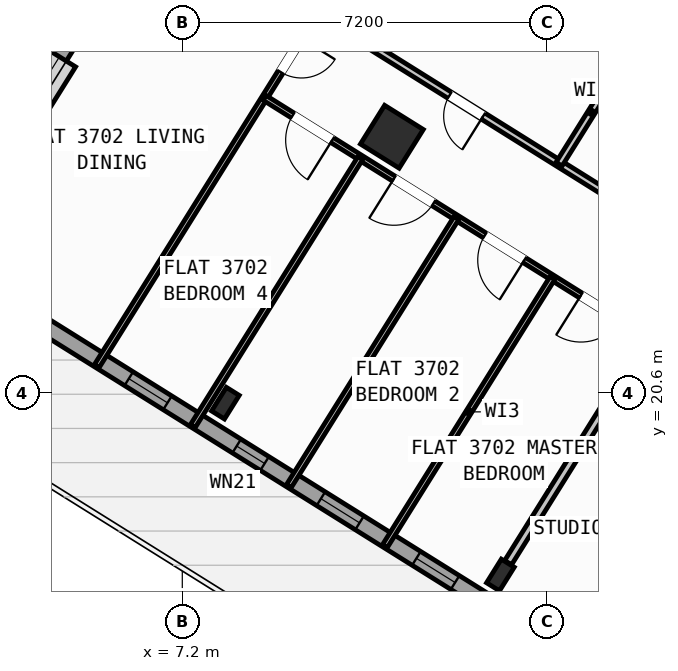
"""IFC4 building model, lengths in metres.
Left out: names, types, materials, properties, quantities, classifications, styles, units other than length and angle.
Written with IfcOpenShell. Run it as: python <this file> out.ifc"""

import sys

from ifc_helpers import new_model, si_unit, direction, frame, frame_2d, origin, origin_2d, place, context, subcontext, project, spatial, rectangle, hollow_rectangle, i_section, extrude, source, transform, mapped, element, fill, save


model = new_model("IFC4")
c1 = context("Model", 3, precision=1e-05, world=origin(), true_north=direction((0.0, 1.0)))
c2 = subcontext(c1, "Body", "Model", "MODEL_VIEW")
j1 = project(units=[si_unit("LENGTHUNIT", "METRE"), si_unit("PLANEANGLEUNIT", "RADIAN")], contexts=[c1])
p1 = place(None, origin())
s1 = spatial("IfcSite", under=j1, at=p1, CompositionType="ELEMENT")
p2 = place(p1, origin())
s2 = spatial("IfcBuilding", under=s1, at=p2, CompositionType="ELEMENT")
p3 = place(p2, frame((0.0, 0.0, 147.9)))
s3 = spatial("IfcBuildingStorey", under=s2, at=p3, CompositionType="ELEMENT", Elevation=147.9)
m1 = source(origin(), c2, "Body", "SweptSolid", [
    extrude(i_section(OverallWidth=0.3, OverallDepth=0.55, WebThickness=0.015, FlangeThickness=0.029, at=origin_2d()), origin(), (0.0, 0.0, 1.0), 3.6),
])
p4 = place(p3, frame((13.478, 17.003, 0.0), z_axis=(0.0, 0.0, 1.0), x_axis=(-0.848048096156, 0.529919264233, 0.0)))
e1 = element("IfcColumn", 1, at=p4, inside=s3, PredefinedType="COLUMN", context=c2, shape_type="MappedRepresentation", body=[
    mapped(m1, transform((0.0, 0.0, 0.0), scale=1.0)),
])
m2 = source(origin(), c2, "Body", "SweptSolid", [
    extrude(hollow_rectangle(XDim=0.9, YDim=0.9, WallThickness=0.036, at=origin_2d()), origin(), (0.0, 0.0, 1.0), 3.6),
])
p5 = place(p3, frame((11.336, 25.653, 0.0), z_axis=(0.0, 0.0, 1.0), x_axis=(-0.848048096156, 0.529919264233, 0.0)))
e2 = element("IfcColumn", 2, at=p5, inside=s3, PredefinedType="COLUMN", context=c2, shape_type="MappedRepresentation", body=[
    mapped(m2, transform((0.0, 0.0, 0.0), scale=1.0)),
])
p6 = place(p3, frame((8.051, 20.395, 0.0), z_axis=(0.0, 0.0, 1.0), x_axis=(-0.848048096156, 0.529919264233, 0.0)))
e3 = element("IfcColumn", 3, at=p6, inside=s3, PredefinedType="COLUMN", context=c2, shape_type="MappedRepresentation", body=[
    mapped(m1, transform((0.0, 0.0, 0.0), scale=1.0)),
])
p7 = place(p3, frame((29.268, 6.429, 0.0), z_axis=(0.0, 0.0, 1.0), x_axis=(-0.848049971435, 0.529916263149, 0.0)))
e4 = element("IfcWall", 4, at=p7, inside=s3, PredefinedType="STANDARD", context=c2, shape_type="SweptSolid", body=[
    extrude(rectangle(XDim=31.588, YDim=0.32, at=frame_2d((15.794, 0.0))), origin(), (0.0, 0.0, 1.0), 3.35),
])
p8 = place(p7, frame((16.362, 0.0, 0.0)))
e5 = element("IfcOpeningElement", 5, at=p8, cuts=e4, PredefinedType="OPENING", context=c2, shape_type="SweptSolid", body=[
    extrude(rectangle(XDim=1.2, YDim=2.15, at=frame_2d((0.6, 1.075))), frame((0.0, 0.17, 0.0), z_axis=(0.0, -1.0, 0.0), x_axis=(1.0, 0.0, 0.0)), (0.0, 0.0, 1.0), 0.34),
])
p9 = place(p7, frame((2.989, 0.0, 0.8)))
e6 = element("IfcOpeningElement", 6, at=p9, cuts=e4, PredefinedType="OPENING", context=c2, shape_type="SweptSolid", body=[
    extrude(rectangle(XDim=2.1, YDim=1.55, at=frame_2d((1.05, 0.775))), frame((0.0, 0.17, 0.0), z_axis=(0.0, -1.0, 0.0), x_axis=(1.0, 0.0, 0.0)), (0.0, 0.0, 1.0), 0.34),
])
p10 = place(p7, frame((8.359, 0.0, 0.8)))
e7 = element("IfcOpeningElement", 7, at=p10, cuts=e4, PredefinedType="OPENING", context=c2, shape_type="SweptSolid", body=[
    extrude(rectangle(XDim=2.1, YDim=1.55, at=frame_2d((1.05, 0.775))), frame((0.0, 0.17, 0.0), z_axis=(0.0, -1.0, 0.0), x_axis=(1.0, 0.0, 0.0)), (0.0, 0.0, 1.0), 0.34),
])
p11 = place(p7, frame((13.284, 0.0, 0.95)))
e8 = element("IfcOpeningElement", 8, at=p11, cuts=e4, PredefinedType="OPENING", context=c2, shape_type="SweptSolid", body=[
    extrude(rectangle(XDim=1.2, YDim=1.4, at=frame_2d((0.6, 0.7))), frame((0.0, 0.17, 0.0), z_axis=(0.0, -1.0, 0.0), x_axis=(1.0, 0.0, 0.0)), (0.0, 0.0, 1.0), 0.34),
])
p12 = place(p7, frame((29.188, 0.0, 0.95)))
e9 = element("IfcOpeningElement", 9, at=p12, cuts=e4, PredefinedType="OPENING", context=c2, shape_type="SweptSolid", body=[
    extrude(rectangle(XDim=1.2, YDim=1.4, at=frame_2d((0.6, 0.7))), frame((0.0, 0.17, 0.0), z_axis=(0.0, -1.0, 0.0), x_axis=(1.0, 0.0, 0.0)), (0.0, 0.0, 1.0), 0.34),
])
p13 = place(p7, frame((19.674, 0.0, 1.0)))
e10 = element("IfcOpeningElement", 10, at=p13, cuts=e4, PredefinedType="OPENING", context=c2, shape_type="SweptSolid", body=[
    extrude(rectangle(XDim=0.9, YDim=1.25, at=frame_2d((0.45, 0.625))), frame((0.0, 0.17, 0.0), z_axis=(0.0, -1.0, 0.0), x_axis=(1.0, 0.0, 0.0)), (0.0, 0.0, 1.0), 0.34),
])
p14 = place(p7, frame((21.896, 0.0, 1.0)))
e11 = element("IfcOpeningElement", 11, at=p14, cuts=e4, PredefinedType="OPENING", context=c2, shape_type="SweptSolid", body=[
    extrude(rectangle(XDim=0.9, YDim=1.25, at=frame_2d((0.45, 0.625))), frame((0.0, 0.17, 0.0), z_axis=(0.0, -1.0, 0.0), x_axis=(1.0, 0.0, 0.0)), (0.0, 0.0, 1.0), 0.34),
])
p15 = place(p7, frame((24.106, 0.0, 1.0)))
e12 = element("IfcOpeningElement", 12, at=p15, cuts=e4, PredefinedType="OPENING", context=c2, shape_type="SweptSolid", body=[
    extrude(rectangle(XDim=0.65, YDim=1.15, at=frame_2d((0.325, 0.575))), frame((0.0, 0.17, 0.0), z_axis=(0.0, -1.0, 0.0), x_axis=(1.0, 0.0, 0.0)), (0.0, 0.0, 1.0), 0.34),
])
p16 = place(p7, frame((26.366, 0.0, 1.0)))
e13 = element("IfcOpeningElement", 13, at=p16, cuts=e4, PredefinedType="OPENING", context=c2, shape_type="SweptSolid", body=[
    extrude(rectangle(XDim=0.9, YDim=1.25, at=frame_2d((0.45, 0.625))), frame((0.0, 0.17, 0.0), z_axis=(0.0, -1.0, 0.0), x_axis=(1.0, 0.0, 0.0)), (0.0, 0.0, 1.0), 0.34),
])
p17 = place(p3, frame((2.415, 23.452, 0.0), z_axis=(0.0, 0.0, 1.0), x_axis=(0.52991049553, 0.848053575387, 0.0)))
e14 = element("IfcWall", 14, at=p17, inside=s3, PredefinedType="STANDARD", context=c2, shape_type="SweptSolid", body=[
    extrude(rectangle(XDim=21.587, YDim=0.32, at=frame_2d((10.794, 0.0))), origin(), (0.0, 0.0, 1.0), 2.775),
])
p18 = place(p17, frame((2.356, 0.0, 0.8)))
e15 = element("IfcOpeningElement", 15, at=p18, cuts=e14, PredefinedType="OPENING", context=c2, shape_type="SweptSolid", body=[
    extrude(rectangle(XDim=2.1, YDim=1.55, at=frame_2d((1.05, 0.775))), frame((0.0, 0.17, 0.0), z_axis=(0.0, -1.0, 0.0), x_axis=(1.0, 0.0, 0.0)), (0.0, 0.0, 1.0), 0.34),
])
p19 = place(p17, frame((8.639, 0.0, 1.0)))
e16 = element("IfcOpeningElement", 16, at=p19, cuts=e14, PredefinedType="OPENING", context=c2, shape_type="SweptSolid", body=[
    extrude(rectangle(XDim=0.9, YDim=1.25, at=frame_2d((0.45, 0.625))), frame((0.0, 0.17, 0.0), z_axis=(0.0, -1.0, 0.0), x_axis=(1.0, 0.0, 0.0)), (0.0, 0.0, 1.0), 0.34),
])
p20 = place(p17, frame((17.744, 0.0, 0.85)))
e17 = element("IfcOpeningElement", 17, at=p20, cuts=e14, PredefinedType="OPENING", context=c2, shape_type="SweptSolid", body=[
    extrude(rectangle(XDim=1.5, YDim=1.5, at=frame_2d((0.75, 0.75))), frame((0.0, 0.17, 0.0), z_axis=(0.0, -1.0, 0.0), x_axis=(1.0, 0.0, 0.0)), (0.0, 0.0, 1.0), 0.34),
])
p21 = place(p3, frame((14.138, 41.825, 0.0), z_axis=(0.0, 0.0, 1.0), x_axis=(0.848046498049, -0.529921821731, 0.0)))
e18 = element("IfcWall", 18, at=p21, inside=s3, PredefinedType="STANDARD", context=c2, shape_type="SweptSolid", body=[
    extrude(rectangle(XDim=31.588, YDim=0.32, at=frame_2d((15.794, 0.0))), origin(), (0.0, 0.0, 1.0), 3.35),
])
p22 = place(p21, frame((2.949, 0.0, 0.0)))
e19 = element("IfcOpeningElement", 19, at=p22, cuts=e18, PredefinedType="OPENING", context=c2, shape_type="SweptSolid", body=[
    extrude(rectangle(XDim=1.05, YDim=2.15, at=frame_2d((0.525, 1.075))), frame((0.0, 0.17, 0.0), z_axis=(0.0, -1.0, 0.0), x_axis=(1.0, 0.0, 0.0)), (0.0, 0.0, 1.0), 0.34),
])
p23 = place(p21, frame((0.861, 0.0, 0.85)))
e20 = element("IfcOpeningElement", 20, at=p23, cuts=e18, PredefinedType="OPENING", context=c2, shape_type="SweptSolid", body=[
    extrude(rectangle(XDim=1.5, YDim=1.5, at=frame_2d((0.75, 0.75))), frame((0.0, 0.17, 0.0), z_axis=(0.0, -1.0, 0.0), x_axis=(1.0, 0.0, 0.0)), (0.0, 0.0, 1.0), 0.34),
])
p24 = place(p21, frame((8.494, 0.0, 0.85)))
e21 = element("IfcOpeningElement", 21, at=p24, cuts=e18, PredefinedType="OPENING", context=c2, shape_type="SweptSolid", body=[
    extrude(rectangle(XDim=1.8, YDim=1.5, at=frame_2d((0.9, 0.75))), frame((0.0, 0.17, 0.0), z_axis=(0.0, -1.0, 0.0), x_axis=(1.0, 0.0, 0.0)), (0.0, 0.0, 1.0), 0.34),
])
p25 = place(p21, frame((13.874, 0.0, 0.85)))
e22 = element("IfcOpeningElement", 22, at=p25, cuts=e18, PredefinedType="OPENING", context=c2, shape_type="SweptSolid", body=[
    extrude(rectangle(XDim=1.5, YDim=1.5, at=frame_2d((0.75, 0.75))), frame((0.0, 0.17, 0.0), z_axis=(0.0, -1.0, 0.0), x_axis=(1.0, 0.0, 0.0)), (0.0, 0.0, 1.0), 0.34),
])
p26 = place(p21, frame((17.104, 0.0, 1.0)))
e23 = element("IfcOpeningElement", 23, at=p26, cuts=e18, PredefinedType="OPENING", context=c2, shape_type="SweptSolid", body=[
    extrude(rectangle(XDim=0.9, YDim=1.25, at=frame_2d((0.45, 0.625))), frame((0.0, 0.17, 0.0), z_axis=(0.0, -1.0, 0.0), x_axis=(1.0, 0.0, 0.0)), (0.0, 0.0, 1.0), 0.34),
])
p27 = place(p21, frame((22.144, 0.0, 1.0)))
e24 = element("IfcOpeningElement", 24, at=p27, cuts=e18, PredefinedType="OPENING", context=c2, shape_type="SweptSolid", body=[
    extrude(rectangle(XDim=0.9, YDim=1.25, at=frame_2d((0.45, 0.625))), frame((0.0, 0.17, 0.0), z_axis=(0.0, -1.0, 0.0), x_axis=(1.0, 0.0, 0.0)), (0.0, 0.0, 1.0), 0.34),
])
p28 = place(p21, frame((27.744, 0.0, 1.0)))
e25 = element("IfcOpeningElement", 25, at=p28, cuts=e18, PredefinedType="OPENING", context=c2, shape_type="SweptSolid", body=[
    extrude(rectangle(XDim=0.9, YDim=1.25, at=frame_2d((0.45, 0.625))), frame((0.0, 0.17, 0.0), z_axis=(0.0, -1.0, 0.0), x_axis=(1.0, 0.0, 0.0)), (0.0, 0.0, 1.0), 0.34),
])
p29 = place(p3, frame((23.104, 25.256, 0.0), z_axis=(0.0, 0.0, 1.0), x_axis=(-0.848041752158, 0.529929416617, 0.0)))
e26 = element("IfcWall", 26, at=p29, inside=s3, PredefinedType="PARTITIONING", context=c2, shape_type="SweptSolid", body=[
    extrude(rectangle(XDim=16.73, YDim=0.16, at=frame_2d((8.365, 0.0))), origin(), (0.0, 0.0, 1.0), 3.34),
])
p30 = place(p29, frame((2.22, 0.0, 0.0)))
e27 = element("IfcOpeningElement", 27, at=p30, cuts=e26, PredefinedType="OPENING", context=c2, shape_type="SweptSolid", body=[
    extrude(rectangle(XDim=0.86, YDim=2.05, at=frame_2d((0.43, 1.025))), frame((0.0, 0.09, 0.0), z_axis=(0.0, -1.0, 0.0), x_axis=(1.0, 0.0, 0.0)), (0.0, 0.0, 1.0), 0.18),
])
p31 = place(p29, frame((12.084, 0.0, 0.0)))
e28 = element("IfcOpeningElement", 28, at=p31, cuts=e26, PredefinedType="OPENING", context=c2, shape_type="SweptSolid", body=[
    extrude(rectangle(XDim=1.0, YDim=2.1, at=frame_2d((0.5, 1.05))), frame((0.0, 0.09, 0.0), z_axis=(0.0, -1.0, 0.0), x_axis=(1.0, 0.0, 0.0)), (0.0, 0.0, 1.0), 0.18),
])
p32 = place(p3, frame((21.938, 23.391, 0.0), z_axis=(0.0, 0.0, 1.0), x_axis=(-0.848045850158, 0.529922858565, 0.0)))
e29 = element("IfcWall", 29, at=p32, inside=s3, PredefinedType="PARTITIONING", context=c2, shape_type="SweptSolid", body=[
    extrude(rectangle(XDim=16.73, YDim=0.16, at=frame_2d((8.365, 0.0))), origin(), (0.0, 0.0, 1.0), 3.34),
])
p33 = place(p32, frame((2.22, 0.0, 0.0)))
e30 = element("IfcOpeningElement", 30, at=p33, cuts=e29, PredefinedType="OPENING", context=c2, shape_type="SweptSolid", body=[
    extrude(rectangle(XDim=0.86, YDim=2.05, at=frame_2d((0.43, 1.025))), frame((0.0, 0.09, 0.0), z_axis=(0.0, -1.0, 0.0), x_axis=(1.0, 0.0, 0.0)), (0.0, 0.0, 1.0), 0.18),
])
p34 = place(p32, frame((14.22, 0.0, 0.0)))
e31 = element("IfcOpeningElement", 31, at=p34, cuts=e29, PredefinedType="OPENING", context=c2, shape_type="SweptSolid", body=[
    extrude(rectangle(XDim=1.0, YDim=2.1, at=frame_2d((0.5, 1.05))), frame((0.0, 0.09, 0.0), z_axis=(0.0, -1.0, 0.0), x_axis=(1.0, 0.0, 0.0)), (0.0, 0.0, 1.0), 0.18),
])
p35 = place(p3, frame((16.519, 21.87, 0.0), z_axis=(0.0, 0.0, 1.0), x_axis=(-0.529922447305, -0.848046107144, 0.0)))
e32 = element("IfcWall", 32, at=p35, inside=s3, PredefinedType="PARTITIONING", context=c2, shape_type="SweptSolid", body=[
    extrude(rectangle(XDim=5.451, YDim=0.16, at=frame_2d((2.726, 0.0))), origin(), (0.0, 0.0, 1.0), 2.775),
])
p36 = place(p3, frame((11.143, 30.136, 0.0), z_axis=(0.0, 0.0, 1.0), x_axis=(-0.529922479612, -0.848046086956, 0.0)))
e33 = element("IfcWall", 33, at=p36, inside=s3, PredefinedType="PARTITIONING", context=c2, shape_type="SweptSolid", body=[
    extrude(rectangle(XDim=10.62, YDim=0.11, at=frame_2d((5.31, 0.0))), origin(), (0.0, 0.0, 1.0), 3.34),
])
p37 = place(p36, frame((3.0, 0.0, 0.0)))
e34 = element("IfcOpeningElement", 34, at=p37, cuts=e33, PredefinedType="OPENING", context=c2, shape_type="SweptSolid", body=[
    extrude(rectangle(XDim=0.78, YDim=2.05, at=frame_2d((0.39, 1.025))), frame((0.0, 0.065, 0.0), z_axis=(0.0, -1.0, 0.0), x_axis=(1.0, 0.0, 0.0)), (0.0, 0.0, 1.0), 0.13),
])
p38 = place(p3, frame((17.452, 23.364, 0.0), z_axis=(0.0, 0.0, 1.0), x_axis=(-0.848044326704, 0.52992529657, 0.0)))
e35 = element("IfcWall", 35, at=p38, inside=s3, PredefinedType="PLUMBINGWALL", context=c2, shape_type="SweptSolid", body=[
    extrude(rectangle(XDim=8.94, YDim=0.14, at=frame_2d((4.47, 0.0))), origin(), (0.0, 0.0, 1.0), 3.34),
])
p39 = place(p38, frame((5.087, 0.0, 0.0)))
e36 = element("IfcOpeningElement", 36, at=p39, cuts=e35, PredefinedType="OPENING", context=c2, shape_type="SweptSolid", body=[
    extrude(rectangle(XDim=0.78, YDim=2.05, at=frame_2d((0.39, 1.025))), frame((0.0, 0.08, 0.0), z_axis=(0.0, -1.0, 0.0), x_axis=(1.0, 0.0, 0.0)), (0.0, 0.0, 1.0), 0.16),
])
p40 = place(p38, frame((1.218, 0.0, 0.0)))
e37 = element("IfcOpeningElement", 37, at=p40, cuts=e35, PredefinedType="OPENING", context=c2, shape_type="SweptSolid", body=[
    extrude(rectangle(XDim=0.78, YDim=2.05, at=frame_2d((0.39, 1.025))), frame((0.0, 0.08, 0.0), z_axis=(0.0, -1.0, 0.0), x_axis=(1.0, 0.0, 0.0)), (0.0, 0.0, 1.0), 0.16),
])
p41 = place(p3, frame((15.913, 27.156, 0.0), z_axis=(0.0, 0.0, 1.0), x_axis=(-0.529935194983, -0.848038141311, 0.0)))
e38 = element("IfcWall", 38, at=p41, inside=s3, PredefinedType="PLUMBINGWALL", context=c2, shape_type="SweptSolid", body=[
    extrude(rectangle(XDim=2.41, YDim=0.14, at=frame_2d((1.205, 0.0))), origin(), (0.0, 0.0, 1.0), 3.34),
])
p42 = place(p3, frame((16.403, 21.685, 0.0), z_axis=(0.0, 0.0, 1.0), x_axis=(-0.848044326704, 0.52992529657, 0.0)))
e39 = element("IfcWall", 39, at=p42, inside=s3, PredefinedType="PARTITIONING", context=c2, shape_type="SweptSolid", body=[
    extrude(rectangle(XDim=8.94, YDim=0.11, at=frame_2d((4.47, 0.0))), origin(), (0.0, 0.0, 1.0), 3.34),
])
p43 = place(p42, frame((0.657, 0.0, 0.0)))
e40 = element("IfcOpeningElement", 40, at=p43, cuts=e39, PredefinedType="OPENING", context=c2, shape_type="SweptSolid", body=[
    extrude(rectangle(XDim=0.92, YDim=2.08, at=frame_2d((0.46, 1.04))), frame((0.0, 0.065, 0.0), z_axis=(0.0, -1.0, 0.0), x_axis=(1.0, 0.0, 0.0)), (0.0, 0.0, 1.0), 0.13),
])
p44 = place(p42, frame((2.893, 0.0, 0.0)))
e41 = element("IfcOpeningElement", 41, at=p44, cuts=e39, PredefinedType="OPENING", context=c2, shape_type="SweptSolid", body=[
    extrude(rectangle(XDim=0.92, YDim=2.08, at=frame_2d((0.46, 1.04))), frame((0.0, 0.065, 0.0), z_axis=(0.0, -1.0, 0.0), x_axis=(1.0, 0.0, 0.0)), (0.0, 0.0, 1.0), 0.13),
])
p45 = place(p42, frame((5.008, 0.0, 0.0)))
e42 = element("IfcOpeningElement", 42, at=p45, cuts=e39, PredefinedType="OPENING", context=c2, shape_type="SweptSolid", body=[
    extrude(rectangle(XDim=0.92, YDim=2.08, at=frame_2d((0.46, 1.04))), frame((0.0, 0.065, 0.0), z_axis=(0.0, -1.0, 0.0), x_axis=(1.0, 0.0, 0.0)), (0.0, 0.0, 1.0), 0.13),
])
p46 = place(p42, frame((7.363, 0.0, 0.0)))
e43 = element("IfcOpeningElement", 43, at=p46, cuts=e39, PredefinedType="OPENING", context=c2, shape_type="SweptSolid", body=[
    extrude(rectangle(XDim=0.92, YDim=2.08, at=frame_2d((0.46, 1.04))), frame((0.0, 0.065, 0.0), z_axis=(0.0, -1.0, 0.0), x_axis=(1.0, 0.0, 0.0)), (0.0, 0.0, 1.0), 0.13),
])
for number, where, z_axis, x_axis in (
    (44, (14.508, 22.869, 0.0), (0.0, 0.0, 1.0), (-0.53, -0.848, 0.0)),
    (45, (12.613, 24.053, 0.0), (0.0, 0.0, 1.0), (-0.53, -0.848, 0.0)),
):
    element("IfcWall", number, at=place(p3, frame(where, z_axis=z_axis, x_axis=x_axis)), inside=s3, PredefinedType="PARTITIONING", context=c2, shape_type="SweptSolid", body=[
        extrude(rectangle(XDim=6.24, YDim=0.11, at=frame_2d((3.12, 0.0))), origin(), (0.0, 0.0, 1.0), 2.995),
    ])
p47 = place(p3, frame((10.717, 25.238, 0.0), z_axis=(0.0, 0.0, 1.0), x_axis=(-0.52991804857, -0.848048855786, 0.0)))
e46 = element("IfcWall", 46, at=p47, inside=s3, PredefinedType="PARTITIONING", context=c2, shape_type="SweptSolid", body=[
    extrude(rectangle(XDim=6.24, YDim=0.11, at=frame_2d((3.12, 0.0))), origin(), (0.0, 0.0, 1.0), 3.34),
])
m3 = source(origin(), c2, "Body", "SweptSolid", [
    extrude(rectangle(XDim=2.1, YDim=1.55, at=frame_2d((1.05, 0.775))), frame((0.0, 0.03, 0.0), z_axis=(0.0, -1.0, 0.0), x_axis=(1.0, 0.0, 0.0)), (0.0, 0.0, 1.0), 0.06),
])
p48 = place(p18, origin())
e47 = element("IfcWindow", 47, at=p48, inside=s3, PartitioningType="SINGLE_PANEL", PredefinedType="WINDOW", context=c2, shape_type="MappedRepresentation", body=[
    mapped(m3, transform((0.0, 0.0, 0.0), scale=1.0)),
])
fill(e15, e47)
m4 = source(origin(), c2, "Body", "SweptSolid", [
    extrude(rectangle(XDim=0.9, YDim=1.25, at=frame_2d((0.45, 0.625))), frame((0.0, 0.03, 0.0), z_axis=(0.0, -1.0, 0.0), x_axis=(1.0, 0.0, 0.0)), (0.0, 0.0, 1.0), 0.06),
])
p49 = place(p13, origin())
e48 = element("IfcWindow", 48, at=p49, inside=s3, PartitioningType="SINGLE_PANEL", PredefinedType="WINDOW", context=c2, shape_type="MappedRepresentation", body=[
    mapped(m4, transform((0.0, 0.0, 0.0), scale=1.0)),
])
fill(e10, e48)
p50 = place(p14, origin())
e49 = element("IfcWindow", 49, at=p50, inside=s3, PartitioningType="SINGLE_PANEL", PredefinedType="WINDOW", context=c2, shape_type="MappedRepresentation", body=[
    mapped(m4, transform((0.0, 0.0, 0.0), scale=1.0)),
])
fill(e11, e49)
m5 = source(origin(), c2, "Body", "SweptSolid", [
    extrude(rectangle(XDim=0.65, YDim=1.15, at=frame_2d((0.325, 0.575))), frame((0.0, 0.03, 0.0), z_axis=(0.0, -1.0, 0.0), x_axis=(1.0, 0.0, 0.0)), (0.0, 0.0, 1.0), 0.06),
])
p51 = place(p15, origin())
e50 = element("IfcWindow", 50, at=p51, inside=s3, PartitioningType="SINGLE_PANEL", PredefinedType="WINDOW", context=c2, shape_type="MappedRepresentation", body=[
    mapped(m5, transform((0.0, 0.0, 0.0), scale=1.0)),
])
fill(e12, e50)
p52 = place(p16, origin())
e51 = element("IfcWindow", 51, at=p52, inside=s3, PartitioningType="SINGLE_PANEL", PredefinedType="WINDOW", context=c2, shape_type="MappedRepresentation", body=[
    mapped(m4, transform((0.0, 0.0, 0.0), scale=1.0)),
])
fill(e13, e51)
m6 = source(origin(), c2, "Body", "SweptSolid", [
    extrude(rectangle(XDim=0.78, YDim=2.05, at=frame_2d((0.39, 1.025))), frame((0.0, 0.025, 0.0), z_axis=(0.0, -1.0, 0.0), x_axis=(1.0, 0.0, 0.0)), (0.0, 0.0, 1.0), 0.05),
])
p53 = place(p37, origin())
e52 = element("IfcDoor", 52, at=p53, inside=s3, OperationType="SINGLE_SWING_LEFT", PredefinedType="DOOR", context=c2, shape_type="MappedRepresentation", body=[
    mapped(m6, transform((0.0, 0.0, 0.0), scale=1.0)),
])
fill(e34, e52)
p54 = place(p39, origin())
e53 = element("IfcDoor", 53, at=p54, inside=s3, OperationType="SINGLE_SWING_LEFT", PredefinedType="DOOR", context=c2, shape_type="MappedRepresentation", body=[
    mapped(m6, transform((0.0, 0.0, 0.0), scale=1.0)),
])
fill(e36, e53)
m7 = source(origin(), c2, "Body", "SweptSolid", [
    extrude(rectangle(XDim=0.92, YDim=2.08, at=frame_2d((0.46, 1.04))), frame((0.0, 0.025, 0.0), z_axis=(0.0, -1.0, 0.0), x_axis=(1.0, 0.0, 0.0)), (0.0, 0.0, 1.0), 0.05),
])
p55 = place(p43, origin())
e54 = element("IfcDoor", 54, at=p55, inside=s3, OperationType="SINGLE_SWING_RIGHT", PredefinedType="DOOR", context=c2, shape_type="MappedRepresentation", body=[
    mapped(m7, transform((0.0, 0.0, 0.0), scale=1.0)),
])
fill(e40, e54)
p56 = place(p44, origin())
e55 = element("IfcDoor", 55, at=p56, inside=s3, OperationType="SINGLE_SWING_LEFT", PredefinedType="DOOR", context=c2, shape_type="MappedRepresentation", body=[
    mapped(m7, transform((0.0, 0.0, 0.0), scale=1.0)),
])
fill(e41, e55)
p57 = place(p45, origin())
e56 = element("IfcDoor", 56, at=p57, inside=s3, OperationType="SINGLE_SWING_RIGHT", PredefinedType="DOOR", context=c2, shape_type="MappedRepresentation", body=[
    mapped(m7, transform((0.0, 0.0, 0.0), scale=1.0)),
])
fill(e42, e56)
p58 = place(p46, origin())
e57 = element("IfcDoor", 57, at=p58, inside=s3, OperationType="SINGLE_SWING_LEFT", PredefinedType="DOOR", context=c2, shape_type="MappedRepresentation", body=[
    mapped(m7, transform((0.0, 0.0, 0.0), scale=1.0)),
])
fill(e43, e57)
save(model, sys.argv[1])
